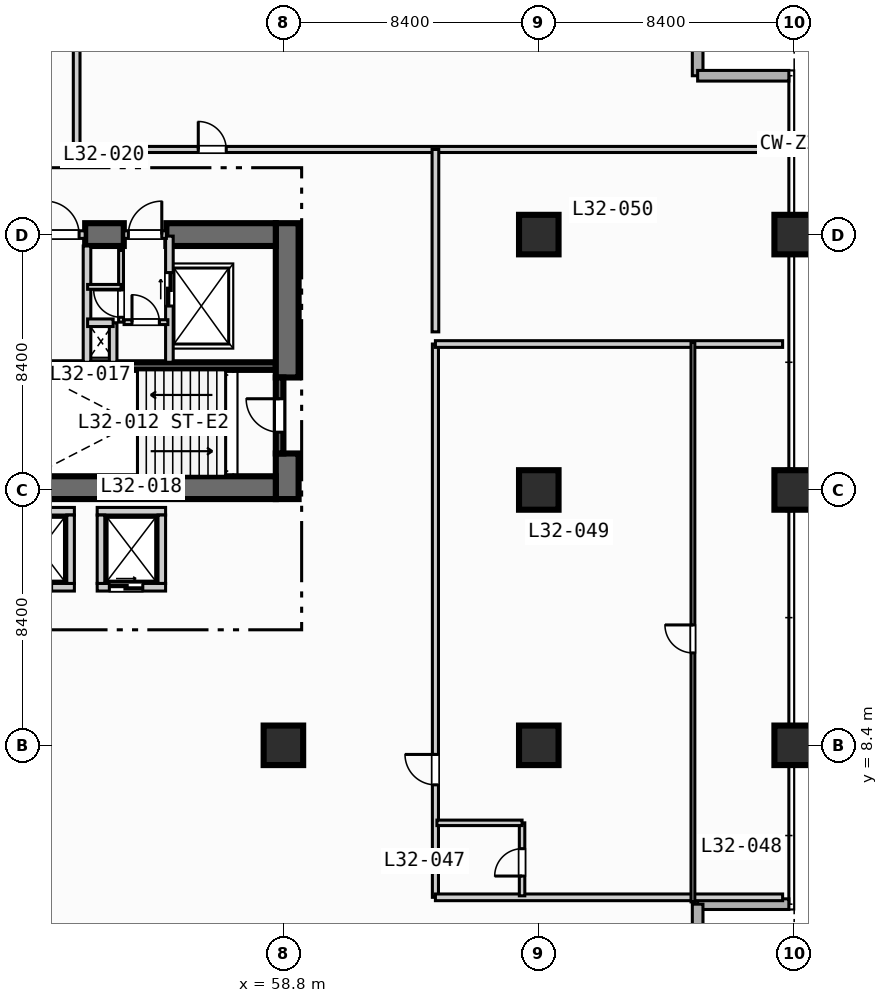
"""IFC4 building model, lengths in metres.
Left out: names, types, materials, properties, quantities, classifications, styles, units other than length and angle.
Written with IfcOpenShell. Run it as: python <this file> out.ifc"""

import sys

from ifc_helpers import new_model, si_unit, direction, frame, frame_2d, origin, origin_2d, place, context, subcontext, project, spatial, rectangle, extrude, element, fill, save


model = new_model("IFC4")
c1 = context("Model", 3, precision=1e-05, world=origin(), true_north=direction((0.0, 1.0)))
c2 = subcontext(c1, "Body", "Model", "MODEL_VIEW")
j1 = project(units=[si_unit("LENGTHUNIT", "METRE"), si_unit("PLANEANGLEUNIT", "RADIAN")], contexts=[c1])
p1 = place(None, origin())
s1 = spatial("IfcSite", under=j1, at=p1, CompositionType="ELEMENT")
p2 = place(p1, origin())
s2 = spatial("IfcBuilding", under=s1, at=p2, CompositionType="ELEMENT")
p3 = place(p2, frame((0.0, 0.0, 134.2)))
s3 = spatial("IfcBuildingStorey", under=s2, at=p3, CompositionType="ELEMENT", Elevation=134.2)
p4 = place(p3, frame((50.5, 20.875, 0.0), z_axis=(0.0, 0.0, 1.0), x_axis=(1.0, 0.0, 0.0)))
e1 = element("IfcWall", 1, at=p4, inside=s3, PredefinedType="SOLIDWALL", context=c2, shape_type="SweptSolid", body=[
    extrude(rectangle(XDim=8.05, YDim=0.25, at=frame_2d((4.025, 0.0))), origin(), (0.0, 0.0, 1.0), 3.55),
])
p5 = place(p3, frame((58.925, 16.5, 0.0), z_axis=(0.0, 0.0, 1.0), x_axis=(0.0, 1.0, 0.0)))
e2 = element("IfcWall", 2, at=p5, inside=s3, PredefinedType="SHEAR", context=c2, shape_type="SweptSolid", body=[
    extrude(rectangle(XDim=1.5, YDim=0.75, at=frame_2d((0.75, 0.0))), origin(), (0.0, 0.0, 1.0), 3.55),
])
p6 = place(p3, frame((58.925, 20.5, 0.0), z_axis=(0.0, 0.0, 1.0), x_axis=(0.0, 1.0, 0.0)))
e3 = element("IfcWall", 3, at=p6, inside=s3, PredefinedType="SHEAR", context=c2, shape_type="SweptSolid", body=[
    extrude(rectangle(XDim=5.075, YDim=0.75, at=frame_2d((2.538, 0.0))), origin(), (0.0, 0.0, 1.0), 3.55),
])
p7 = place(p3, frame((42.2, 16.875, 0.0), z_axis=(0.0, 0.0, 1.0), x_axis=(1.0, 0.0, 0.0)))
e4 = element("IfcWall", 4, at=p7, inside=s3, PredefinedType="SHEAR", context=c2, shape_type="SweptSolid", body=[
    extrude(rectangle(XDim=16.35, YDim=0.75, at=frame_2d((8.175, 0.0))), origin(), (0.0, 0.0, 1.0), 3.55),
])
p8 = place(p3, frame((52.28, 25.2, 0.0), z_axis=(0.0, 0.0, 1.0), x_axis=(1.0, 0.0, 0.0)))
e5 = element("IfcWall", 5, at=p8, inside=s3, PredefinedType="SHEAR", context=c2, shape_type="SweptSolid", body=[
    extrude(rectangle(XDim=1.27, YDim=0.75, at=frame_2d((0.635, 0.0))), origin(), (0.0, 0.0, 1.0), 3.55),
])
p9 = place(p3, frame((54.95, 25.2, 0.0), z_axis=(0.0, 0.0, 1.0), x_axis=(1.0, 0.0, 0.0)))
e6 = element("IfcWall", 6, at=p9, inside=s3, PredefinedType="SHEAR", context=c2, shape_type="SweptSolid", body=[
    extrude(rectangle(XDim=3.6, YDim=0.75, at=frame_2d((1.8, 0.0))), origin(), (0.0, 0.0, 1.0), 3.55),
])
for number, where, z_axis, x_axis in (
    (7, (58.8, 8.4, 0.0), (0.0, 0.0, 1.0), (1.0, 0.0, 0.0)),
    (8, (67.2, 8.4, 0.0), (0.0, 0.0, 1.0), (1.0, 0.0, 0.0)),
    (9, (67.2, 16.8, 0.0), (0.0, 0.0, 1.0), (1.0, 0.0, 0.0)),
    (10, (67.2, 25.2, 0.0), (0.0, 0.0, 1.0), (1.0, 0.0, 0.0)),
    (11, (75.6, 8.4, 0.0), (0.0, 0.0, 1.0), (1.0, 0.0, 0.0)),
    (12, (75.6, 16.8, 0.0), (0.0, 0.0, 1.0), (1.0, 0.0, 0.0)),
    (13, (75.6, 25.2, 0.0), (0.0, 0.0, 1.0), (1.0, 0.0, 0.0)),
):
    element("IfcColumn", number, at=place(p3, frame(where, z_axis=z_axis, x_axis=x_axis)), inside=s3, PredefinedType="COLUMN", context=c2, shape_type="SweptSolid", body=[
        extrude(rectangle(XDim=1.3, YDim=1.3, at=origin_2d()), origin(), (0.0, 0.0, 1.0), 3.8),
    ])
for number, where, z_axis, x_axis in (
    (14, (72.425, 33.425, 0.0), (0.0, 0.0, 1.0), (0.0, -1.0, 0.0)),
    (15, (72.425, 30.425, 0.0), (0.0, 0.0, 1.0), (1.0, 0.0, 0.0)),
    (16, (75.425, 3.175, 0.0), (0.0, 0.0, 1.0), (-1.0, 0.0, 0.0)),
    (17, (72.425, 3.175, 0.0), (0.0, 0.0, 1.0), (0.0, -1.0, 0.0)),
):
    element("IfcWall", number, at=place(p3, frame(where, z_axis=z_axis, x_axis=x_axis)), inside=s3, PredefinedType="STANDARD", context=c2, shape_type="SweptSolid", body=[
        extrude(rectangle(XDim=3.0, YDim=0.35, at=frame_2d((1.5, 0.0))), origin(), (0.0, 0.0, 1.0), 3.55),
    ])
p10 = place(p3, frame((58.675, 18.0, 0.0), z_axis=(0.0, 0.0, 1.0), x_axis=(0.0, 1.0, 0.0)))
e18 = element("IfcWall", 18, at=p10, inside=s3, PredefinedType="SOLIDWALL", context=c2, shape_type="SweptSolid", body=[
    extrude(rectangle(XDim=2.5, YDim=0.25, at=frame_2d((1.25, 0.0))), origin(), (0.0, 0.0, 1.0), 3.55),
])
p11 = place(p10, frame((0.7, 0.0, 0.0)))
e19 = element("IfcOpeningElement", 19, at=p11, cuts=e18, PredefinedType="OPENING", context=c2, shape_type="SweptSolid", body=[
    extrude(rectangle(XDim=1.1, YDim=2.15, at=frame_2d((0.55, 1.075))), frame((0.0, 0.135, 0.0), z_axis=(0.0, -1.0, 0.0), x_axis=(1.0, 0.0, 0.0)), (0.0, 0.0, 1.0), 0.27),
])
p12 = place(p3, frame((50.8, 25.2, 0.0), z_axis=(0.0, 0.0, 1.0), x_axis=(1.0, 0.0, 0.0)))
e20 = element("IfcWall", 20, at=p12, inside=s3, PredefinedType="SOLIDWALL", context=c2, shape_type="SweptSolid", body=[
    extrude(rectangle(XDim=1.48, YDim=0.25, at=frame_2d((0.74, 0.0))), origin(), (0.0, 0.0, 1.0), 3.55),
])
p13 = place(p12, frame((0.18, 0.0, 0.0)))
e21 = element("IfcOpeningElement", 21, at=p13, cuts=e20, PredefinedType="OPENING", context=c2, shape_type="SweptSolid", body=[
    extrude(rectangle(XDim=1.1, YDim=2.15, at=frame_2d((0.55, 1.075))), frame((0.0, 0.135, 0.0), z_axis=(0.0, -1.0, 0.0), x_axis=(1.0, 0.0, 0.0)), (0.0, 0.0, 1.0), 0.27),
])
p14 = place(p3, frame((52.34, 21.0, 0.0), z_axis=(0.0, 0.0, 1.0), x_axis=(0.0, 1.0, 0.0)))
e22 = element("IfcWall", 22, at=p14, inside=s3, PredefinedType="SOLIDWALL", context=c2, shape_type="SweptSolid", body=[
    extrude(rectangle(XDim=3.825, YDim=0.25, at=frame_2d((1.913, 0.0))), origin(), (0.0, 0.0, 1.0), 3.55),
])
p15 = place(p3, frame((55.05, 21.0, 0.0), z_axis=(0.0, 0.0, 1.0), x_axis=(0.0, 1.0, 0.0)))
e23 = element("IfcWall", 23, at=p15, inside=s3, PredefinedType="SOLIDWALL", context=c2, shape_type="SweptSolid", body=[
    extrude(rectangle(XDim=4.15, YDim=0.25, at=frame_2d((2.075, 0.0))), origin(), (0.0, 0.0, 1.0), 3.55),
])
p16 = place(p15, frame((1.85, 0.0, 0.0)))
e24 = element("IfcOpeningElement", 24, at=p16, cuts=e23, PredefinedType="OPENING", context=c2, shape_type="SweptSolid", body=[
    extrude(rectangle(XDim=1.1, YDim=2.15, at=frame_2d((0.55, 1.075))), frame((0.0, 0.135, 0.0), z_axis=(0.0, -1.0, 0.0), x_axis=(1.0, 0.0, 0.0)), (0.0, 0.0, 1.0), 0.27),
])
p17 = place(p3, frame((53.55, 25.2, 0.0), z_axis=(0.0, 0.0, 1.0), x_axis=(1.0, 0.0, 0.0)))
e25 = element("IfcWall", 25, at=p17, inside=s3, PredefinedType="SOLIDWALL", context=c2, shape_type="SweptSolid", body=[
    extrude(rectangle(XDim=1.4, YDim=0.25, at=frame_2d((0.7, 0.0))), origin(), (0.0, 0.0, 1.0), 3.55),
])
p18 = place(p17, frame((0.15, 0.0, 0.0)))
e26 = element("IfcOpeningElement", 26, at=p18, cuts=e25, PredefinedType="OPENING", context=c2, shape_type="SweptSolid", body=[
    extrude(rectangle(XDim=1.1, YDim=2.15, at=frame_2d((0.55, 1.075))), frame((0.0, 0.135, 0.0), z_axis=(0.0, -1.0, 0.0), x_axis=(1.0, 0.0, 0.0)), (0.0, 0.0, 1.0), 0.27),
])
p19 = place(p3, frame((53.2, 21.0, 0.0), z_axis=(0.0, 0.0, 1.0), x_axis=(0.0, 1.0, 0.0)))
e27 = element("IfcWall", 27, at=p19, inside=s3, PredefinedType="SOLIDWALL", context=c2, shape_type="SweptSolid", body=[
    extrude(rectangle(XDim=1.3, YDim=0.25, at=frame_2d((0.65, 0.0))), origin(), (0.0, 0.0, 1.0), 3.55),
])
p20 = place(p3, frame((52.36, 22.3, 0.0), z_axis=(0.0, 0.0, 1.0), x_axis=(1.0, 0.0, 0.0)))
e28 = element("IfcWall", 28, at=p20, inside=s3, PredefinedType="SOLIDWALL", context=c2, shape_type="SweptSolid", body=[
    extrude(rectangle(XDim=0.84, YDim=0.25, at=frame_2d((0.42, 0.0))), origin(), (0.0, 0.0, 1.0), 3.55),
])
p21 = place(p3, frame((53.56, 22.32, 0.0), z_axis=(0.0, 0.0, 1.0), x_axis=(1.0, 0.0, 0.0)))
e29 = element("IfcWall", 29, at=p21, inside=s3, PredefinedType="PARTITIONING", context=c2, shape_type="SweptSolid", body=[
    extrude(rectangle(XDim=1.44, YDim=0.16, at=frame_2d((0.72, 0.0))), origin(), (0.0, 0.0, 1.0), 3.55),
])
p22 = place(p21, frame((0.26, 0.0, 0.0)))
e30 = element("IfcOpeningElement", 30, at=p22, cuts=e29, PredefinedType="OPENING", context=c2, shape_type="SweptSolid", body=[
    extrude(rectangle(XDim=0.9, YDim=2.1, at=frame_2d((0.45, 1.05))), frame((0.0, 0.09, 0.0), z_axis=(0.0, -1.0, 0.0), x_axis=(1.0, 0.0, 0.0)), (0.0, 0.0, 1.0), 0.18),
])
p23 = place(p3, frame((53.46, 22.32, 0.0), z_axis=(0.0, 0.0, 1.0), x_axis=(0.0, 1.0, 0.0)))
e31 = element("IfcWall", 31, at=p23, inside=s3, PredefinedType="PARTITIONING", context=c2, shape_type="SweptSolid", body=[
    extrude(rectangle(XDim=2.36, YDim=0.16, at=frame_2d((1.18, 0.0))), origin(), (0.0, 0.0, 1.0), 3.55),
])
p24 = place(p23, frame((0.16, 0.0, 0.0)))
e32 = element("IfcOpeningElement", 32, at=p24, cuts=e31, PredefinedType="OPENING", context=c2, shape_type="SweptSolid", body=[
    extrude(rectangle(XDim=0.9, YDim=2.1, at=frame_2d((0.45, 1.05))), frame((0.0, 0.09, 0.0), z_axis=(0.0, -1.0, 0.0), x_axis=(1.0, 0.0, 0.0)), (0.0, 0.0, 1.0), 0.18),
])
p25 = place(p3, frame((52.36, 23.48, 0.0), z_axis=(0.0, 0.0, 1.0), x_axis=(1.0, 0.0, 0.0)))
e33 = element("IfcWall", 33, at=p25, inside=s3, PredefinedType="PARTITIONING", context=c2, shape_type="SweptSolid", body=[
    extrude(rectangle(XDim=1.1, YDim=0.16, at=frame_2d((0.55, 0.0))), origin(), (0.0, 0.0, 1.0), 3.55),
])
p26 = place(p3, frame((49.675, 13.6, 0.0), z_axis=(0.0, 0.0, 1.0), x_axis=(1.0, 0.0, 0.0)))
e34 = element("IfcWall", 34, at=p26, inside=s3, PredefinedType="SOLIDWALL", context=c2, shape_type="SweptSolid", body=[
    extrude(rectangle(XDim=2.25, YDim=0.25, at=frame_2d((1.125, 0.0))), origin(), (0.0, 0.0, 1.0), 3.55),
])
p27 = place(p26, frame((0.4, 0.0, 0.0)))
e35 = element("IfcOpeningElement", 35, at=p27, cuts=e34, PredefinedType="OPENING", context=c2, shape_type="SweptSolid", body=[
    extrude(rectangle(XDim=1.1, YDim=2.15, at=frame_2d((0.55, 1.075))), frame((0.0, 0.135, 0.0), z_axis=(0.0, -1.0, 0.0), x_axis=(1.0, 0.0, 0.0)), (0.0, 0.0, 1.0), 0.27),
])
for number, where, z_axis, x_axis in (
    (36, (49.675, 16.1, 0.0), (0.0, 0.0, 1.0), (1.0, 0.0, 0.0)),
    (37, (51.8, 13.725, 0.0), (0.0, 0.0, 1.0), (0.0, 1.0, 0.0)),
):
    element("IfcWall", number, at=place(p3, frame(where, z_axis=z_axis, x_axis=x_axis)), inside=s3, PredefinedType="SOLIDWALL", context=c2, shape_type="SweptSolid", body=[
        extrude(rectangle(XDim=2.25, YDim=0.25, at=frame_2d((1.125, 0.0))), origin(), (0.0, 0.0, 1.0), 3.55),
    ])
p28 = place(p3, frame((52.675, 13.6, 0.0), z_axis=(0.0, 0.0, 1.0), x_axis=(1.0, 0.0, 0.0)))
e38 = element("IfcWall", 38, at=p28, inside=s3, PredefinedType="SOLIDWALL", context=c2, shape_type="SweptSolid", body=[
    extrude(rectangle(XDim=2.25, YDim=0.25, at=frame_2d((1.125, 0.0))), origin(), (0.0, 0.0, 1.0), 3.55),
])
p29 = place(p28, frame((0.4, 0.0, 0.0)))
e39 = element("IfcOpeningElement", 39, at=p29, cuts=e38, PredefinedType="OPENING", context=c2, shape_type="SweptSolid", body=[
    extrude(rectangle(XDim=1.1, YDim=2.15, at=frame_2d((0.55, 1.075))), frame((0.0, 0.135, 0.0), z_axis=(0.0, -1.0, 0.0), x_axis=(1.0, 0.0, 0.0)), (0.0, 0.0, 1.0), 0.27),
])
for number, where, z_axis, x_axis in (
    (40, (52.675, 16.1, 0.0), (0.0, 0.0, 1.0), (1.0, 0.0, 0.0)),
    (41, (52.8, 13.725, 0.0), (0.0, 0.0, 1.0), (0.0, 1.0, 0.0)),
    (42, (54.8, 13.725, 0.0), (0.0, 0.0, 1.0), (0.0, 1.0, 0.0)),
):
    element("IfcWall", number, at=place(p3, frame(where, z_axis=z_axis, x_axis=x_axis)), inside=s3, PredefinedType="SOLIDWALL", context=c2, shape_type="SweptSolid", body=[
        extrude(rectangle(XDim=2.25, YDim=0.25, at=frame_2d((1.125, 0.0))), origin(), (0.0, 0.0, 1.0), 3.55),
    ])
p30 = place(p3, frame((63.8, 3.4, 0.0), z_axis=(0.0, 0.0, 1.0), x_axis=(0.0, 1.0, 0.0)))
e43 = element("IfcWall", 43, at=p30, inside=s3, PredefinedType="PARTITIONING", context=c2, shape_type="SweptSolid", body=[
    extrude(rectangle(XDim=18.2, YDim=0.2, at=frame_2d((9.1, 0.0))), origin(), (0.0, 0.0, 1.0), 3.55),
])
p31 = place(p30, frame((3.7, 0.0, 0.0)))
e44 = element("IfcOpeningElement", 44, at=p31, cuts=e43, PredefinedType="OPENING", context=c2, shape_type="SweptSolid", body=[
    extrude(rectangle(XDim=1.0, YDim=2.15, at=frame_2d((0.5, 1.075))), frame((0.0, 0.11, 0.0), z_axis=(0.0, -1.0, 0.0), x_axis=(1.0, 0.0, 0.0)), (0.0, 0.0, 1.0), 0.22),
])
for number, where, z_axis, x_axis in (
    (45, (63.8, 3.4, 0.0), (0.0, 0.0, 1.0), (1.0, 0.0, 0.0)),
    (46, (63.8, 21.6, 0.0), (0.0, 0.0, 1.0), (1.0, 0.0, 0.0)),
):
    element("IfcWall", number, at=place(p3, frame(where, z_axis=z_axis, x_axis=x_axis)), inside=s3, PredefinedType="PARTITIONING", context=c2, shape_type="SweptSolid", body=[
        extrude(rectangle(XDim=11.42, YDim=0.22, at=frame_2d((5.71, 0.0))), origin(), (0.0, 0.0, 1.0), 3.55),
    ])
p32 = place(p3, frame((66.65, 3.45, 0.0), z_axis=(0.0, 0.0, 1.0), x_axis=(0.0, 1.0, 0.0)))
e47 = element("IfcWall", 47, at=p32, inside=s3, PredefinedType="PLUMBINGWALL", context=c2, shape_type="SweptSolid", body=[
    extrude(rectangle(XDim=2.4, YDim=0.18, at=frame_2d((1.2, 0.0))), origin(), (0.0, 0.0, 1.0), 3.55),
])
p33 = place(p32, frame((0.65, 0.0, 0.0)))
e48 = element("IfcOpeningElement", 48, at=p33, cuts=e47, PredefinedType="OPENING", context=c2, shape_type="SweptSolid", body=[
    extrude(rectangle(XDim=0.9, YDim=2.1, at=frame_2d((0.45, 1.05))), frame((0.0, 0.1, 0.0), z_axis=(0.0, -1.0, 0.0), x_axis=(1.0, 0.0, 0.0)), (0.0, 0.0, 1.0), 0.2),
])
p34 = place(p3, frame((63.85, 5.85, 0.0), z_axis=(0.0, 0.0, 1.0), x_axis=(1.0, 0.0, 0.0)))
e49 = element("IfcWall", 49, at=p34, inside=s3, PredefinedType="PLUMBINGWALL", context=c2, shape_type="SweptSolid", body=[
    extrude(rectangle(XDim=2.8, YDim=0.18, at=frame_2d((1.4, 0.0))), origin(), (0.0, 0.0, 1.0), 3.55),
])
p35 = place(p3, frame((72.27, 3.25, 0.0), z_axis=(0.0, 0.0, 1.0), x_axis=(0.0, 1.0, 0.0)))
e50 = element("IfcWall", 50, at=p35, inside=s3, PredefinedType="PARTITIONING", context=c2, shape_type="SweptSolid", body=[
    extrude(rectangle(XDim=18.4, YDim=0.125, at=frame_2d((9.2, 0.0))), origin(), (0.0, 0.0, 1.0), 3.55),
])
p36 = place(p35, frame((8.19, 0.0, 0.0)))
e51 = element("IfcOpeningElement", 51, at=p36, cuts=e50, PredefinedType="OPENING", context=c2, shape_type="SweptSolid", body=[
    extrude(rectangle(XDim=0.92, YDim=2.1, at=frame_2d((0.46, 1.05))), frame((0.0, 0.073, 0.0), z_axis=(0.0, -1.0, 0.0), x_axis=(1.0, 0.0, 0.0)), (0.0, 0.0, 1.0), 0.145),
])
p37 = place(p3, frame((52.0, 28.0, 0.0), z_axis=(0.0, 0.0, 1.0), x_axis=(1.0, 0.0, 0.0)))
e52 = element("IfcWall", 52, at=p37, inside=s3, PredefinedType="PARTITIONING", context=c2, shape_type="SweptSolid", body=[
    extrude(rectangle(XDim=23.25, YDim=0.2, at=frame_2d((11.625, 0.0))), origin(), (0.0, 0.0, 1.0), 3.55),
])
p38 = place(p37, frame((4.0, 0.0, 0.0)))
e53 = element("IfcOpeningElement", 53, at=p38, cuts=e52, PredefinedType="OPENING", context=c2, shape_type="SweptSolid", body=[
    extrude(rectangle(XDim=0.92, YDim=2.1, at=frame_2d((0.46, 1.05))), frame((0.0, 0.11, 0.0), z_axis=(0.0, -1.0, 0.0), x_axis=(1.0, 0.0, 0.0)), (0.0, 0.0, 1.0), 0.22),
])
p39 = place(p3, frame((52.0, 28.0, 0.0), z_axis=(0.0, 0.0, 1.0), x_axis=(0.0, 1.0, 0.0)))
e54 = element("IfcWall", 54, at=p39, inside=s3, PredefinedType="PARTITIONING", context=c2, shape_type="SweptSolid", body=[
    extrude(rectangle(XDim=5.3, YDim=0.22, at=frame_2d((2.65, 0.0))), origin(), (0.0, 0.0, 1.0), 3.55),
])
p40 = place(p3, frame((63.8, 22.0, 0.0), z_axis=(0.0, 0.0, 1.0), x_axis=(0.0, 1.0, 0.0)))
e55 = element("IfcWall", 55, at=p40, inside=s3, PredefinedType="PARTITIONING", context=c2, shape_type="SweptSolid", body=[
    extrude(rectangle(XDim=6.0, YDim=0.22, at=frame_2d((3.0, 0.0))), origin(), (0.0, 0.0, 1.0), 3.55),
])
p41 = place(p11, origin())
e56 = element("IfcDoor", 56, at=p41, inside=s3, OperationType="SINGLE_SWING_RIGHT", PredefinedType="DOOR", context=c2, shape_type="SweptSolid", body=[
    extrude(rectangle(XDim=1.1, YDim=2.15, at=frame_2d((0.55, 1.075))), frame((0.0, 0.025, 0.0), z_axis=(0.0, -1.0, 0.0), x_axis=(1.0, 0.0, 0.0)), (0.0, 0.0, 1.0), 0.05),
])
fill(e19, e56)
p42 = place(p13, origin())
e57 = element("IfcDoor", 57, at=p42, inside=s3, OperationType="SINGLE_SWING_LEFT", PredefinedType="DOOR", context=c2, shape_type="SweptSolid", body=[
    extrude(rectangle(XDim=1.1, YDim=2.15, at=frame_2d((0.55, 1.075))), frame((0.0, 0.025, 0.0), z_axis=(0.0, -1.0, 0.0), x_axis=(1.0, 0.0, 0.0)), (0.0, 0.0, 1.0), 0.05),
])
fill(e21, e57)
p43 = place(p16, origin())
e58 = element("IfcDoor", 58, at=p43, inside=s3, OperationType="SLIDING_TO_LEFT", PredefinedType="DOOR", context=c2, shape_type="SweptSolid", body=[
    extrude(rectangle(XDim=1.1, YDim=2.15, at=frame_2d((0.55, 1.075))), frame((0.0, 0.025, 0.0), z_axis=(0.0, -1.0, 0.0), x_axis=(1.0, 0.0, 0.0)), (0.0, 0.0, 1.0), 0.05),
])
fill(e24, e58)
p44 = place(p18, origin())
e59 = element("IfcDoor", 59, at=p44, inside=s3, OperationType="SINGLE_SWING_RIGHT", PredefinedType="DOOR", context=c2, shape_type="SweptSolid", body=[
    extrude(rectangle(XDim=1.1, YDim=2.15, at=frame_2d((0.55, 1.075))), frame((0.0, 0.025, 0.0), z_axis=(0.0, -1.0, 0.0), x_axis=(1.0, 0.0, 0.0)), (0.0, 0.0, 1.0), 0.05),
])
fill(e26, e59)
p45 = place(p22, origin())
e60 = element("IfcDoor", 60, at=p45, inside=s3, OperationType="SINGLE_SWING_LEFT", PredefinedType="DOOR", context=c2, shape_type="SweptSolid", body=[
    extrude(rectangle(XDim=0.9, YDim=2.1, at=frame_2d((0.45, 1.05))), frame((0.0, 0.025, 0.0), z_axis=(0.0, -1.0, 0.0), x_axis=(1.0, 0.0, 0.0)), (0.0, 0.0, 1.0), 0.05),
])
fill(e30, e60)
p46 = place(p24, origin())
e61 = element("IfcDoor", 61, at=p46, inside=s3, OperationType="SINGLE_SWING_RIGHT", PredefinedType="DOOR", context=c2, shape_type="SweptSolid", body=[
    extrude(rectangle(XDim=0.9, YDim=2.1, at=frame_2d((0.45, 1.05))), frame((0.0, 0.025, 0.0), z_axis=(0.0, -1.0, 0.0), x_axis=(1.0, 0.0, 0.0)), (0.0, 0.0, 1.0), 0.05),
])
fill(e32, e61)
p47 = place(p29, origin())
e62 = element("IfcDoor", 62, at=p47, inside=s3, OperationType="SLIDING_TO_LEFT", PredefinedType="DOOR", context=c2, shape_type="SweptSolid", body=[
    extrude(rectangle(XDim=1.1, YDim=2.15, at=frame_2d((0.55, 1.075))), frame((0.0, 0.025, 0.0), z_axis=(0.0, -1.0, 0.0), x_axis=(1.0, 0.0, 0.0)), (0.0, 0.0, 1.0), 0.05),
])
fill(e39, e62)
p48 = place(p31, origin())
e63 = element("IfcDoor", 63, at=p48, inside=s3, OperationType="SINGLE_SWING_RIGHT", PredefinedType="DOOR", context=c2, shape_type="SweptSolid", body=[
    extrude(rectangle(XDim=1.0, YDim=2.15, at=frame_2d((0.5, 1.075))), frame((0.0, 0.025, 0.0), z_axis=(0.0, -1.0, 0.0), x_axis=(1.0, 0.0, 0.0)), (0.0, 0.0, 1.0), 0.05),
])
fill(e44, e63)
p49 = place(p33, origin())
e64 = element("IfcDoor", 64, at=p49, inside=s3, OperationType="SINGLE_SWING_LEFT", PredefinedType="DOOR", context=c2, shape_type="SweptSolid", body=[
    extrude(rectangle(XDim=0.9, YDim=2.1, at=frame_2d((0.45, 1.05))), frame((0.0, 0.025, 0.0), z_axis=(0.0, -1.0, 0.0), x_axis=(1.0, 0.0, 0.0)), (0.0, 0.0, 1.0), 0.05),
])
fill(e48, e64)
p50 = place(p36, origin())
e65 = element("IfcDoor", 65, at=p50, inside=s3, OperationType="SINGLE_SWING_RIGHT", PredefinedType="DOOR", context=c2, shape_type="SweptSolid", body=[
    extrude(rectangle(XDim=0.92, YDim=2.1, at=frame_2d((0.46, 1.05))), frame((0.0, 0.025, 0.0), z_axis=(0.0, -1.0, 0.0), x_axis=(1.0, 0.0, 0.0)), (0.0, 0.0, 1.0), 0.05),
])
fill(e51, e65)
p51 = place(p38, origin())
e66 = element("IfcDoor", 66, at=p51, inside=s3, OperationType="SINGLE_SWING_LEFT", PredefinedType="DOOR", context=c2, shape_type="SweptSolid", body=[
    extrude(rectangle(XDim=0.92, YDim=2.1, at=frame_2d((0.46, 1.05))), frame((0.0, 0.025, 0.0), z_axis=(0.0, -1.0, 0.0), x_axis=(1.0, 0.0, 0.0)), (0.0, 0.0, 1.0), 0.05),
])
fill(e53, e66)
save(model, sys.argv[1])
